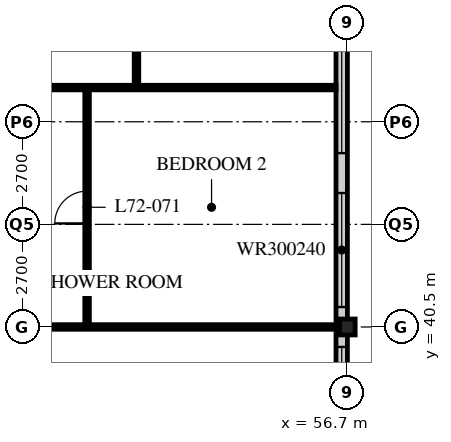
"""IFC4 building model, lengths in metres.
Left out: names, types, materials, properties, quantities, classifications, styles, units other than length and angle.
Written with IfcOpenShell. Run it as: python <this file> out.ifc"""

import sys

from ifc_helpers import new_model, si_unit, direction, frame, frame_2d, origin, origin_2d, place, context, subcontext, project, spatial, rectangle, i_section, extrude, element, fill, save


model = new_model("IFC4")
c1 = context("Model", 3, precision=1e-05, world=origin(), true_north=direction((0.0, 1.0)))
c2 = subcontext(c1, "Body", "Model", "MODEL_VIEW")
j1 = project(units=[si_unit("LENGTHUNIT", "METRE"), si_unit("PLANEANGLEUNIT", "RADIAN")], contexts=[c1])
p1 = place(None, origin())
s1 = spatial("IfcSite", under=j1, at=p1, CompositionType="ELEMENT")
p2 = place(p1, origin())
s2 = spatial("IfcBuilding", under=s1, at=p2, CompositionType="ELEMENT")
p3 = place(p2, frame((0.0, 0.0, 281.4)))
s3 = spatial("IfcBuildingStorey", under=s2, at=p3, CompositionType="ELEMENT", Elevation=281.4)
p4 = place(p3, frame((56.7, 40.5, 0.0), z_axis=(0.0, 0.0, 1.0), x_axis=(1.0, 0.0, 0.0)))
e1 = element("IfcColumn", 1, at=p4, inside=s3, PredefinedType="COLUMN", context=c2, shape_type="SweptSolid", body=[
    extrude(i_section(OverallWidth=0.407, OverallDepth=0.419, WebThickness=0.031, FlangeThickness=0.049, FilletRadius=0.015, at=origin_2d()), origin(), (0.0, 0.0, 1.0), 3.9),
])
p5 = place(p3, frame((56.55, 24.6, 0.0), z_axis=(0.0, 0.0, 1.0), x_axis=(0.0, 1.0, 0.0)))
e2 = element("IfcWall", 2, at=p5, inside=s3, PredefinedType="SOLIDWALL", context=c2, shape_type="SweptSolid", body=[
    extrude(rectangle(XDim=32.1, YDim=0.3, at=frame_2d((16.05, 0.0))), origin(), (0.0, 0.0, 1.0), 3.69),
])
p6 = place(p5, frame((0.225, 0.0, 0.6)))
e3 = element("IfcOpeningElement", 3, at=p6, cuts=e2, PredefinedType="OPENING", context=c2, shape_type="SweptSolid", body=[
    extrude(rectangle(XDim=3.0, YDim=2.4, at=frame_2d((1.5, 1.2))), frame((0.0, 0.16, 0.0), z_axis=(0.0, -1.0, 0.0), x_axis=(1.0, 0.0, 0.0)), (0.0, 0.0, 1.0), 0.32),
])
p7 = place(p5, frame((4.275, 0.0, 0.6)))
e4 = element("IfcOpeningElement", 4, at=p7, cuts=e2, PredefinedType="OPENING", context=c2, shape_type="SweptSolid", body=[
    extrude(rectangle(XDim=3.0, YDim=2.4, at=frame_2d((1.5, 1.2))), frame((0.0, 0.16, 0.0), z_axis=(0.0, -1.0, 0.0), x_axis=(1.0, 0.0, 0.0)), (0.0, 0.0, 1.0), 0.32),
])
p8 = place(p5, frame((8.325, 0.0, 0.6)))
e5 = element("IfcOpeningElement", 5, at=p8, cuts=e2, PredefinedType="OPENING", context=c2, shape_type="SweptSolid", body=[
    extrude(rectangle(XDim=3.0, YDim=2.4, at=frame_2d((1.5, 1.2))), frame((0.0, 0.16, 0.0), z_axis=(0.0, -1.0, 0.0), x_axis=(1.0, 0.0, 0.0)), (0.0, 0.0, 1.0), 0.32),
])
p9 = place(p5, frame((12.375, 0.0, 0.6)))
e6 = element("IfcOpeningElement", 6, at=p9, cuts=e2, PredefinedType="OPENING", context=c2, shape_type="SweptSolid", body=[
    extrude(rectangle(XDim=3.0, YDim=2.4, at=frame_2d((1.5, 1.2))), frame((0.0, 0.16, 0.0), z_axis=(0.0, -1.0, 0.0), x_axis=(1.0, 0.0, 0.0)), (0.0, 0.0, 1.0), 0.32),
])
p10 = place(p5, frame((16.425, 0.0, 0.6)))
e7 = element("IfcOpeningElement", 7, at=p10, cuts=e2, PredefinedType="OPENING", context=c2, shape_type="SweptSolid", body=[
    extrude(rectangle(XDim=3.0, YDim=2.4, at=frame_2d((1.5, 1.2))), frame((0.0, 0.16, 0.0), z_axis=(0.0, -1.0, 0.0), x_axis=(1.0, 0.0, 0.0)), (0.0, 0.0, 1.0), 0.32),
])
p11 = place(p5, frame((20.475, 0.0, 0.6)))
e8 = element("IfcOpeningElement", 8, at=p11, cuts=e2, PredefinedType="OPENING", context=c2, shape_type="SweptSolid", body=[
    extrude(rectangle(XDim=3.0, YDim=2.4, at=frame_2d((1.5, 1.2))), frame((0.0, 0.16, 0.0), z_axis=(0.0, -1.0, 0.0), x_axis=(1.0, 0.0, 0.0)), (0.0, 0.0, 1.0), 0.32),
])
p12 = place(p5, frame((24.525, 0.0, 0.6)))
e9 = element("IfcOpeningElement", 9, at=p12, cuts=e2, PredefinedType="OPENING", context=c2, shape_type="SweptSolid", body=[
    extrude(rectangle(XDim=3.0, YDim=2.4, at=frame_2d((1.5, 1.2))), frame((0.0, 0.16, 0.0), z_axis=(0.0, -1.0, 0.0), x_axis=(1.0, 0.0, 0.0)), (0.0, 0.0, 1.0), 0.32),
])
p13 = place(p5, frame((28.575, 0.0, 0.6)))
e10 = element("IfcOpeningElement", 10, at=p13, cuts=e2, PredefinedType="OPENING", context=c2, shape_type="SweptSolid", body=[
    extrude(rectangle(XDim=3.0, YDim=2.4, at=frame_2d((1.5, 1.2))), frame((0.0, 0.16, 0.0), z_axis=(0.0, -1.0, 0.0), x_axis=(1.0, 0.0, 0.0)), (0.0, 0.0, 1.0), 0.32),
])
p14 = place(p3, frame((42.9, 46.8, 0.0), z_axis=(0.0, 0.0, 1.0), x_axis=(1.0, 0.0, 0.0)))
e11 = element("IfcWall", 11, at=p14, inside=s3, PredefinedType="PARTITIONING", context=c2, shape_type="SweptSolid", body=[
    extrude(rectangle(XDim=13.5, YDim=0.12, at=frame_2d((6.75, 0.0))), origin(), (0.0, 0.0, 1.0), 3.69),
])
p15 = place(p3, frame((42.9, 40.5, 0.0), z_axis=(0.0, 0.0, 1.0), x_axis=(1.0, 0.0, 0.0)))
e12 = element("IfcWall", 12, at=p15, inside=s3, PredefinedType="PARTITIONING", context=c2, shape_type="SweptSolid", body=[
    extrude(rectangle(XDim=13.5, YDim=0.12, at=frame_2d((6.75, 0.0))), origin(), (0.0, 0.0, 1.0), 3.078),
])
p16 = place(p3, frame((51.15, 46.8, 0.0), z_axis=(0.0, 0.0, 1.0), x_axis=(0.0, 1.0, 0.0)))
e13 = element("IfcWall", 13, at=p16, inside=s3, PredefinedType="PARTITIONING", context=c2, shape_type="SweptSolid", body=[
    extrude(rectangle(XDim=7.8, YDim=0.12, at=frame_2d((3.9, 0.0))), origin(), (0.0, 0.0, 1.0), 3.69),
])
p17 = place(p16, frame((3.475, 0.0, 0.0)))
e14 = element("IfcOpeningElement", 14, at=p17, cuts=e13, PredefinedType="OPENING", context=c2, shape_type="SweptSolid", body=[
    extrude(rectangle(XDim=0.85, YDim=2.1, at=frame_2d((0.425, 1.05))), frame((0.0, 0.07, 0.0), z_axis=(0.0, -1.0, 0.0), x_axis=(1.0, 0.0, 0.0)), (0.0, 0.0, 1.0), 0.14),
])
p18 = place(p3, frame((49.85, 40.5, 0.0), z_axis=(0.0, 0.0, 1.0), x_axis=(0.0, 1.0, 0.0)))
e15 = element("IfcWall", 15, at=p18, inside=s3, PredefinedType="PARTITIONING", context=c2, shape_type="SweptSolid", body=[
    extrude(rectangle(XDim=6.3, YDim=0.12, at=frame_2d((3.15, 0.0))), origin(), (0.0, 0.0, 1.0), 3.69),
])
p19 = place(p18, frame((2.725, 0.0, 0.0)))
e16 = element("IfcOpeningElement", 16, at=p19, cuts=e15, PredefinedType="OPENING", context=c2, shape_type="SweptSolid", body=[
    extrude(rectangle(XDim=0.85, YDim=2.1, at=frame_2d((0.425, 1.05))), frame((0.0, 0.07, 0.0), z_axis=(0.0, -1.0, 0.0), x_axis=(1.0, 0.0, 0.0)), (0.0, 0.0, 1.0), 0.14),
])
p20 = place(p9, origin())
e17 = element("IfcWindow", 17, at=p20, inside=s3, PartitioningType="SINGLE_PANEL", PredefinedType="WINDOW", context=c2, shape_type="SweptSolid", body=[
    extrude(rectangle(XDim=3.0, YDim=2.4, at=frame_2d((1.5, 1.2))), frame((0.0, 0.03, 0.0), z_axis=(0.0, -1.0, 0.0), x_axis=(1.0, 0.0, 0.0)), (0.0, 0.0, 1.0), 0.06),
])
fill(e6, e17)
p21 = place(p10, origin())
e18 = element("IfcWindow", 18, at=p21, inside=s3, PartitioningType="SINGLE_PANEL", PredefinedType="WINDOW", context=c2, shape_type="SweptSolid", body=[
    extrude(rectangle(XDim=3.0, YDim=2.4, at=frame_2d((1.5, 1.2))), frame((0.0, 0.03, 0.0), z_axis=(0.0, -1.0, 0.0), x_axis=(1.0, 0.0, 0.0)), (0.0, 0.0, 1.0), 0.06),
])
fill(e7, e18)
p22 = place(p11, origin())
e19 = element("IfcWindow", 19, at=p22, inside=s3, PartitioningType="SINGLE_PANEL", PredefinedType="WINDOW", context=c2, shape_type="SweptSolid", body=[
    extrude(rectangle(XDim=3.0, YDim=2.4, at=frame_2d((1.5, 1.2))), frame((0.0, 0.03, 0.0), z_axis=(0.0, -1.0, 0.0), x_axis=(1.0, 0.0, 0.0)), (0.0, 0.0, 1.0), 0.06),
])
fill(e8, e19)
p23 = place(p19, origin())
e20 = element("IfcDoor", 20, at=p23, inside=s3, OperationType="SINGLE_SWING_LEFT", PredefinedType="DOOR", context=c2, shape_type="SweptSolid", body=[
    extrude(rectangle(XDim=0.85, YDim=2.1, at=frame_2d((0.425, 1.05))), frame((0.0, 0.025, 0.0), z_axis=(0.0, -1.0, 0.0), x_axis=(1.0, 0.0, 0.0)), (0.0, 0.0, 1.0), 0.05),
])
fill(e16, e20)
save(model, sys.argv[1])
